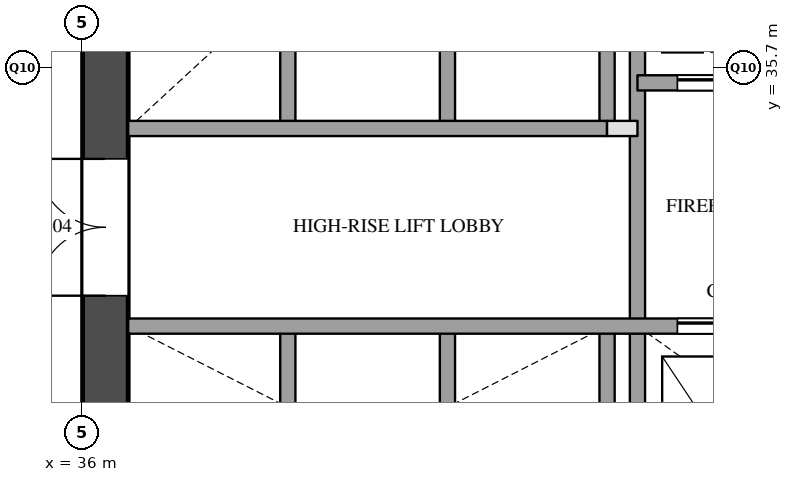
"""IFC4 building model, lengths in metres.
Left out: names, types, materials, properties, quantities, classifications, styles, units other than length and angle.
Written with IfcOpenShell. Run it as: python <this file> out.ifc"""

import sys

from ifc_helpers import new_model, si_unit, direction, frame, frame_2d, origin, place, context, subcontext, project, spatial, rectangle, extrude, element, fill, save


model = new_model("IFC4")
c1 = context("Model", 3, precision=1e-05, world=origin(), true_north=direction((0.0, 1.0)))
c2 = subcontext(c1, "Body", "Model", "MODEL_VIEW")
j1 = project(units=[si_unit("LENGTHUNIT", "METRE"), si_unit("PLANEANGLEUNIT", "RADIAN")], contexts=[c1])
p1 = place(None, origin())
s1 = spatial("IfcSite", under=j1, at=p1, CompositionType="ELEMENT")
p2 = place(p1, origin())
s2 = spatial("IfcBuilding", under=s1, at=p2, CompositionType="ELEMENT")
p3 = place(p2, frame((0.0, 0.0, 81.6)))
s3 = spatial("IfcBuildingStorey", under=s2, at=p3, CompositionType="ELEMENT", Elevation=81.6)
p4 = place(p3, frame((36.3, 29.1, 0.0), z_axis=(0.0, 0.0, 1.0), x_axis=(0.0, 1.0, 0.0)))
e1 = element("IfcWall", 1, at=p4, inside=s3, PredefinedType="SHEAR", context=c2, shape_type="SweptSolid", body=[
    extrude(rectangle(XDim=20.3, YDim=0.6, at=frame_2d((10.15, 0.0))), origin(), (0.0, 0.0, 1.0), 3.5),
])
p5 = place(p4, frame((3.6, 0.0, 0.0)))
e2 = element("IfcOpeningElement", 2, at=p5, cuts=e1, PredefinedType="OPENING", context=c2, shape_type="SweptSolid", body=[
    extrude(rectangle(XDim=1.8, YDim=2.1, at=frame_2d((0.9, 1.05))), frame((0.0, 0.31, 0.0), z_axis=(0.0, -1.0, 0.0), x_axis=(1.0, 0.0, 0.0)), (0.0, 0.0, 1.0), 0.62),
])
p6 = place(p4, frame((16.4, 0.0, 0.0)))
e3 = element("IfcOpeningElement", 3, at=p6, cuts=e1, PredefinedType="OPENING", context=c2, shape_type="SweptSolid", body=[
    extrude(rectangle(XDim=1.0, YDim=2.1, at=frame_2d((0.5, 1.05))), frame((0.0, 0.31, 0.0), z_axis=(0.0, -1.0, 0.0), x_axis=(1.0, 0.0, 0.0)), (0.0, 0.0, 1.0), 0.62),
])
p7 = place(p3, frame((38.7, 29.1, 0.0), z_axis=(0.0, 0.0, 1.0), x_axis=(0.0, 1.0, 0.0)))
e4 = element("IfcWall", 4, at=p7, inside=s3, PredefinedType="SOLIDWALL", context=c2, shape_type="SweptSolid", body=[
    extrude(rectangle(XDim=3.2, YDim=0.2, at=frame_2d((1.6, 0.0))), origin(), (0.0, 0.0, 1.0), 3.5),
])
p8 = place(p3, frame((38.7, 34.9, 0.0), z_axis=(0.0, 0.0, 1.0), x_axis=(0.0, 1.0, 0.0)))
e5 = element("IfcWall", 5, at=p8, inside=s3, PredefinedType="SOLIDWALL", context=c2, shape_type="SweptSolid", body=[
    extrude(rectangle(XDim=3.2, YDim=0.2, at=frame_2d((1.6, 0.0))), origin(), (0.0, 0.0, 1.0), 3.5),
])
p9 = place(p3, frame((40.8, 29.1, 0.0), z_axis=(0.0, 0.0, 1.0), x_axis=(0.0, 1.0, 0.0)))
e6 = element("IfcWall", 6, at=p9, inside=s3, PredefinedType="SOLIDWALL", context=c2, shape_type="SweptSolid", body=[
    extrude(rectangle(XDim=3.2, YDim=0.2, at=frame_2d((1.6, 0.0))), origin(), (0.0, 0.0, 1.0), 3.5),
])
p10 = place(p3, frame((40.8, 34.9, 0.0), z_axis=(0.0, 0.0, 1.0), x_axis=(0.0, 1.0, 0.0)))
e7 = element("IfcWall", 7, at=p10, inside=s3, PredefinedType="SOLIDWALL", context=c2, shape_type="SweptSolid", body=[
    extrude(rectangle(XDim=3.2, YDim=0.2, at=frame_2d((1.6, 0.0))), origin(), (0.0, 0.0, 1.0), 3.5),
])
p11 = place(p3, frame((42.9, 29.1, 0.0), z_axis=(0.0, 0.0, 1.0), x_axis=(0.0, 1.0, 0.0)))
e8 = element("IfcWall", 8, at=p11, inside=s3, PredefinedType="SOLIDWALL", context=c2, shape_type="SweptSolid", body=[
    extrude(rectangle(XDim=3.2, YDim=0.2, at=frame_2d((1.6, 0.0))), origin(), (0.0, 0.0, 1.0), 3.5),
])
p12 = place(p3, frame((42.9, 34.9, 0.0), z_axis=(0.0, 0.0, 1.0), x_axis=(0.0, 1.0, 0.0)))
e9 = element("IfcWall", 9, at=p12, inside=s3, PredefinedType="SOLIDWALL", context=c2, shape_type="SweptSolid", body=[
    extrude(rectangle(XDim=3.2, YDim=0.2, at=frame_2d((1.6, 0.0))), origin(), (0.0, 0.0, 1.0), 3.5),
])
p13 = place(p3, frame((43.3, 29.1, 0.0), z_axis=(0.0, 0.0, 1.0), x_axis=(0.0, 1.0, 0.0)))
e10 = element("IfcWall", 10, at=p13, inside=s3, PredefinedType="SOLIDWALL", context=c2, shape_type="SweptSolid", body=[
    extrude(rectangle(XDim=9.9, YDim=0.2, at=frame_2d((4.95, 0.0))), origin(), (0.0, 0.0, 1.0), 3.5),
])
p14 = place(p3, frame((36.6, 32.3, 0.0), z_axis=(0.0, 0.0, 1.0), x_axis=(1.0, 0.0, 0.0)))
e11 = element("IfcWall", 11, at=p14, inside=s3, PredefinedType="SOLIDWALL", context=c2, shape_type="SweptSolid", body=[
    extrude(rectangle(XDim=11.2, YDim=0.2, at=frame_2d((5.6, 0.0))), origin(), (0.0, 0.0, 1.0), 3.5),
])
p15 = place(p14, frame((7.225, 0.0, 0.0)))
e12 = element("IfcOpeningElement", 12, at=p15, cuts=e11, PredefinedType="OPENING", context=c2, shape_type="SweptSolid", body=[
    extrude(rectangle(XDim=1.2, YDim=2.1, at=frame_2d((0.6, 1.05))), frame((0.0, 0.11, 0.0), z_axis=(0.0, -1.0, 0.0), x_axis=(1.0, 0.0, 0.0)), (0.0, 0.0, 1.0), 0.22),
])
p16 = place(p14, frame((9.475, 0.0, 0.0)))
e13 = element("IfcOpeningElement", 13, at=p16, cuts=e11, PredefinedType="OPENING", context=c2, shape_type="SweptSolid", body=[
    extrude(rectangle(XDim=1.2, YDim=2.1, at=frame_2d((0.6, 1.05))), frame((0.0, 0.11, 0.0), z_axis=(0.0, -1.0, 0.0), x_axis=(1.0, 0.0, 0.0)), (0.0, 0.0, 1.0), 0.22),
])
p17 = place(p3, frame((42.9, 34.9, 0.0), z_axis=(0.0, 0.0, 1.0), x_axis=(1.0, 0.0, 0.0)))
e14 = element("IfcWall", 14, at=p17, inside=s3, PredefinedType="PARTITIONING", context=c2, shape_type="SweptSolid", body=[
    extrude(rectangle(XDim=0.4, YDim=0.2, at=frame_2d((0.2, 0.0))), origin(), (0.0, 0.0, 1.0), 3.5),
])
p18 = place(p3, frame((36.6, 34.9, 0.0), z_axis=(0.0, 0.0, 1.0), x_axis=(1.0, 0.0, 0.0)))
e15 = element("IfcWall", 15, at=p18, inside=s3, PredefinedType="SOLIDWALL", context=c2, shape_type="SweptSolid", body=[
    extrude(rectangle(XDim=6.3, YDim=0.2, at=frame_2d((3.15, 0.0))), origin(), (0.0, 0.0, 1.0), 3.5),
])
p19 = place(p3, frame((43.3, 35.5, 0.0), z_axis=(0.0, 0.0, 1.0), x_axis=(1.0, 0.0, 0.0)))
e16 = element("IfcWall", 16, at=p19, inside=s3, PredefinedType="SOLIDWALL", context=c2, shape_type="SweptSolid", body=[
    extrude(rectangle(XDim=4.5, YDim=0.2, at=frame_2d((2.25, 0.0))), origin(), (0.0, 0.0, 1.0), 3.5),
])
p20 = place(p19, frame((0.525, 0.0, 0.0)))
e17 = element("IfcOpeningElement", 17, at=p20, cuts=e16, PredefinedType="OPENING", context=c2, shape_type="SweptSolid", body=[
    extrude(rectangle(XDim=1.2, YDim=2.1, at=frame_2d((0.6, 1.05))), frame((0.0, 0.11, 0.0), z_axis=(0.0, -1.0, 0.0), x_axis=(1.0, 0.0, 0.0)), (0.0, 0.0, 1.0), 0.22),
])
p21 = place(p19, frame((3.025, 0.0, 0.0)))
e18 = element("IfcOpeningElement", 18, at=p21, cuts=e16, PredefinedType="OPENING", context=c2, shape_type="SweptSolid", body=[
    extrude(rectangle(XDim=0.7, YDim=2.1, at=frame_2d((0.35, 1.05))), frame((0.0, 0.11, 0.0), z_axis=(0.0, -1.0, 0.0), x_axis=(1.0, 0.0, 0.0)), (0.0, 0.0, 1.0), 0.22),
])
p22 = place(p15, origin())
e19 = element("IfcDoor", 19, at=p22, inside=s3, OperationType="SLIDING_TO_LEFT", PredefinedType="DOOR", context=c2, shape_type="SweptSolid", body=[
    extrude(rectangle(XDim=1.2, YDim=2.1, at=frame_2d((0.6, 1.05))), frame((0.0, 0.025, 0.0), z_axis=(0.0, -1.0, 0.0), x_axis=(1.0, 0.0, 0.0)), (0.0, 0.0, 1.0), 0.05),
])
fill(e12, e19)
p23 = place(p20, origin())
e20 = element("IfcDoor", 20, at=p23, inside=s3, OperationType="SLIDING_TO_LEFT", PredefinedType="DOOR", context=c2, shape_type="SweptSolid", body=[
    extrude(rectangle(XDim=1.2, YDim=2.1, at=frame_2d((0.6, 1.05))), frame((0.0, 0.025, 0.0), z_axis=(0.0, -1.0, 0.0), x_axis=(1.0, 0.0, 0.0)), (0.0, 0.0, 1.0), 0.05),
])
fill(e17, e20)
p24 = place(p5, origin())
e21 = element("IfcDoor", 21, at=p24, inside=s3, OperationType="DOUBLE_DOOR_SINGLE_SWING", PredefinedType="DOOR", context=c2, shape_type="SweptSolid", body=[
    extrude(rectangle(XDim=1.8, YDim=2.1, at=frame_2d((0.9, 1.05))), frame((0.0, 0.025, 0.0), z_axis=(0.0, -1.0, 0.0), x_axis=(1.0, 0.0, 0.0)), (0.0, 0.0, 1.0), 0.05),
])
fill(e2, e21)
save(model, sys.argv[1])
